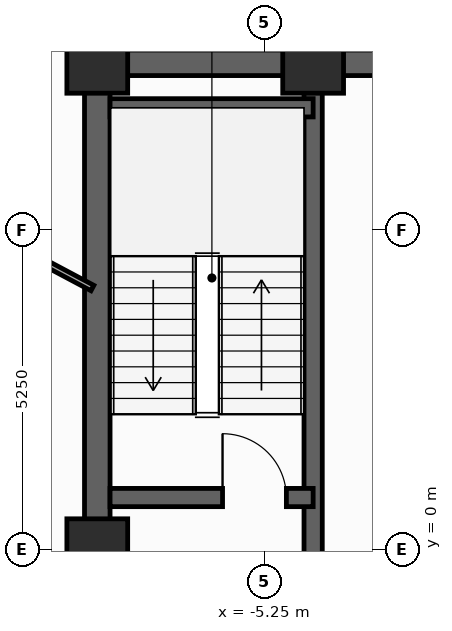
"""IFC4 building model, lengths in metres.
Left out: names, types, materials, properties, quantities, classifications, styles, units other than length and angle.
Written with IfcOpenShell. Run it as: python <this file> out.ifc"""

import sys

from ifc_helpers import new_model, si_unit, direction, frame, frame_2d, origin, origin_2d, place, context, subcontext, project, spatial, rectangle, extrude, element, fill, save


model = new_model("IFC4")
c1 = context("Model", 3, precision=1e-05, world=origin(), true_north=direction((0.0, 1.0)))
c2 = subcontext(c1, "Body", "Model", "MODEL_VIEW")
j1 = project(units=[si_unit("LENGTHUNIT", "METRE"), si_unit("PLANEANGLEUNIT", "RADIAN")], contexts=[c1])
p1 = place(None, origin())
s1 = spatial("IfcSite", under=j1, at=p1, CompositionType="ELEMENT")
p2 = place(p1, origin())
s2 = spatial("IfcBuilding", under=s1, at=p2, CompositionType="ELEMENT")
p3 = place(p2, frame((0.0, 0.0, 274.4)))
s3 = spatial("IfcBuildingStorey", under=s2, at=p3, CompositionType="ELEMENT", Elevation=274.4)
for number, where, z_axis, x_axis in (
    (1, (-4.45, 8.0, 0.0), (0.0, 0.0, 1.0), (1.0, 0.0, 0.0)),
    (2, (-8.0, 8.0, 0.0), (0.0, 0.0, 1.0), (1.0, 0.0, 0.0)),
    (3, (-8.0, 0.0, 0.0), (0.0, 0.0, 1.0), (1.0, 0.0, 0.0)),
):
    element("IfcColumn", number, at=place(p3, frame(where, z_axis=z_axis, x_axis=x_axis)), inside=s3, PredefinedType="COLUMN", context=c2, shape_type="SweptSolid", body=[
        extrude(rectangle(XDim=1.0, YDim=1.0, at=origin_2d()), origin(), (0.0, 0.0, 1.0), 3.7),
    ])
p4 = place(p3, frame((-8.0, -8.0, 0.0), z_axis=(0.0, 0.0, 1.0), x_axis=(0.0, 1.0, 0.0)))
e4 = element("IfcWall", 4, at=p4, inside=s3, PredefinedType="SHEAR", context=c2, shape_type="SweptSolid", body=[
    extrude(rectangle(XDim=16.0, YDim=0.42, at=frame_2d((8.0, 0.0))), origin(), (0.0, 0.0, 1.0), 3.46),
])
p5 = place(p4, frame((0.681, 0.0, 0.0)))
e5 = element("IfcOpeningElement", 5, at=p5, cuts=e4, PredefinedType="OPENING", context=c2, shape_type="SweptSolid", body=[
    extrude(rectangle(XDim=0.85, YDim=2.02, at=frame_2d((0.425, 1.01))), frame((0.0, 0.22, 0.0), z_axis=(0.0, -1.0, 0.0), x_axis=(1.0, 0.0, 0.0)), (0.0, 0.0, 1.0), 0.44),
])
p6 = place(p4, frame((5.35, 0.0, 0.0)))
e6 = element("IfcOpeningElement", 6, at=p6, cuts=e4, PredefinedType="OPENING", context=c2, shape_type="SweptSolid", body=[
    extrude(rectangle(XDim=1.05, YDim=2.15, at=frame_2d((0.525, 1.075))), frame((0.0, 0.22, 0.0), z_axis=(0.0, -1.0, 0.0), x_axis=(1.0, 0.0, 0.0)), (0.0, 0.0, 1.0), 0.44),
])
p7 = place(p3, frame((-8.0, 8.0, 0.0), z_axis=(0.0, 0.0, 1.0), x_axis=(1.0, 0.0, 0.0)))
e7 = element("IfcWall", 7, at=p7, inside=s3, PredefinedType="SHEAR", context=c2, shape_type="SweptSolid", body=[
    extrude(rectangle(XDim=16.0, YDim=0.42, at=frame_2d((8.0, 0.0))), origin(), (0.0, 0.0, 1.0), 3.46),
])
p8 = place(p7, frame((7.1, 0.0, 0.0)))
e8 = element("IfcOpeningElement", 8, at=p8, cuts=e7, PredefinedType="OPENING", context=c2, shape_type="SweptSolid", body=[
    extrude(rectangle(XDim=1.8, YDim=2.15, at=frame_2d((0.9, 1.075))), frame((0.0, 0.22, 0.0), z_axis=(0.0, -1.0, 0.0), x_axis=(1.0, 0.0, 0.0)), (0.0, 0.0, 1.0), 0.44),
])
p9 = place(p3, frame((-4.45, -7.79, 0.0), z_axis=(0.0, 0.0, 1.0), x_axis=(0.0, 1.0, 0.0)))
e9 = element("IfcWall", 9, at=p9, inside=s3, PredefinedType="SHEAR", context=c2, shape_type="SweptSolid", body=[
    extrude(rectangle(XDim=15.58, YDim=0.3, at=frame_2d((7.79, 0.0))), origin(), (0.0, 0.0, 1.0), 3.46),
])
p10 = place(p3, frame((-7.79, 0.85, 0.0), z_axis=(0.0, 0.0, 1.0), x_axis=(1.0, 0.0, 0.0)))
e10 = element("IfcWall", 10, at=p10, inside=s3, PredefinedType="SHEAR", context=c2, shape_type="SweptSolid", body=[
    extrude(rectangle(XDim=3.34, YDim=0.3, at=frame_2d((1.67, 0.0))), origin(), (0.0, 0.0, 1.0), 3.46),
])
p11 = place(p10, frame((1.85, 0.0, 0.0)))
e11 = element("IfcOpeningElement", 11, at=p11, cuts=e10, PredefinedType="OPENING", context=c2, shape_type="SweptSolid", body=[
    extrude(rectangle(XDim=1.05, YDim=2.15, at=frame_2d((0.525, 1.075))), frame((0.0, 0.16, 0.0), z_axis=(0.0, -1.0, 0.0), x_axis=(1.0, 0.0, 0.0)), (0.0, 0.0, 1.0), 0.32),
])
p12 = place(p3, frame((-7.79, 7.26, 0.0), z_axis=(0.0, 0.0, 1.0), x_axis=(1.0, 0.0, 0.0)))
e12 = element("IfcWall", 12, at=p12, inside=s3, PredefinedType="SHEAR", context=c2, shape_type="SweptSolid", body=[
    extrude(rectangle(XDim=3.34, YDim=0.3, at=frame_2d((1.67, 0.0))), origin(), (0.0, 0.0, 1.0), 3.46),
])
p13 = place(p3, frame((-8.08, 4.296, 0.0), z_axis=(0.0, 0.0, 1.0), x_axis=(-0.882957693651, 0.469452565465, 0.0)))
e13 = element("IfcWall", 13, at=p13, inside=s3, PredefinedType="MOVABLE", context=c2, shape_type="SweptSolid", body=[
    extrude(rectangle(XDim=6.563, YDim=0.1, at=frame_2d((3.281, 0.0))), origin(), (0.0, 0.0, 1.0), 2.845),
])
p14 = place(p11, origin())
e14 = element("IfcDoor", 14, at=p14, inside=s3, OperationType="SINGLE_SWING_LEFT", PredefinedType="DOOR", context=c2, shape_type="SweptSolid", body=[
    extrude(rectangle(XDim=1.05, YDim=2.15, at=frame_2d((0.525, 1.075))), frame((0.0, 0.025, 0.0), z_axis=(0.0, -1.0, 0.0), x_axis=(1.0, 0.0, 0.0)), (0.0, 0.0, 1.0), 0.05),
])
fill(e11, e14)
save(model, sys.argv[1])
